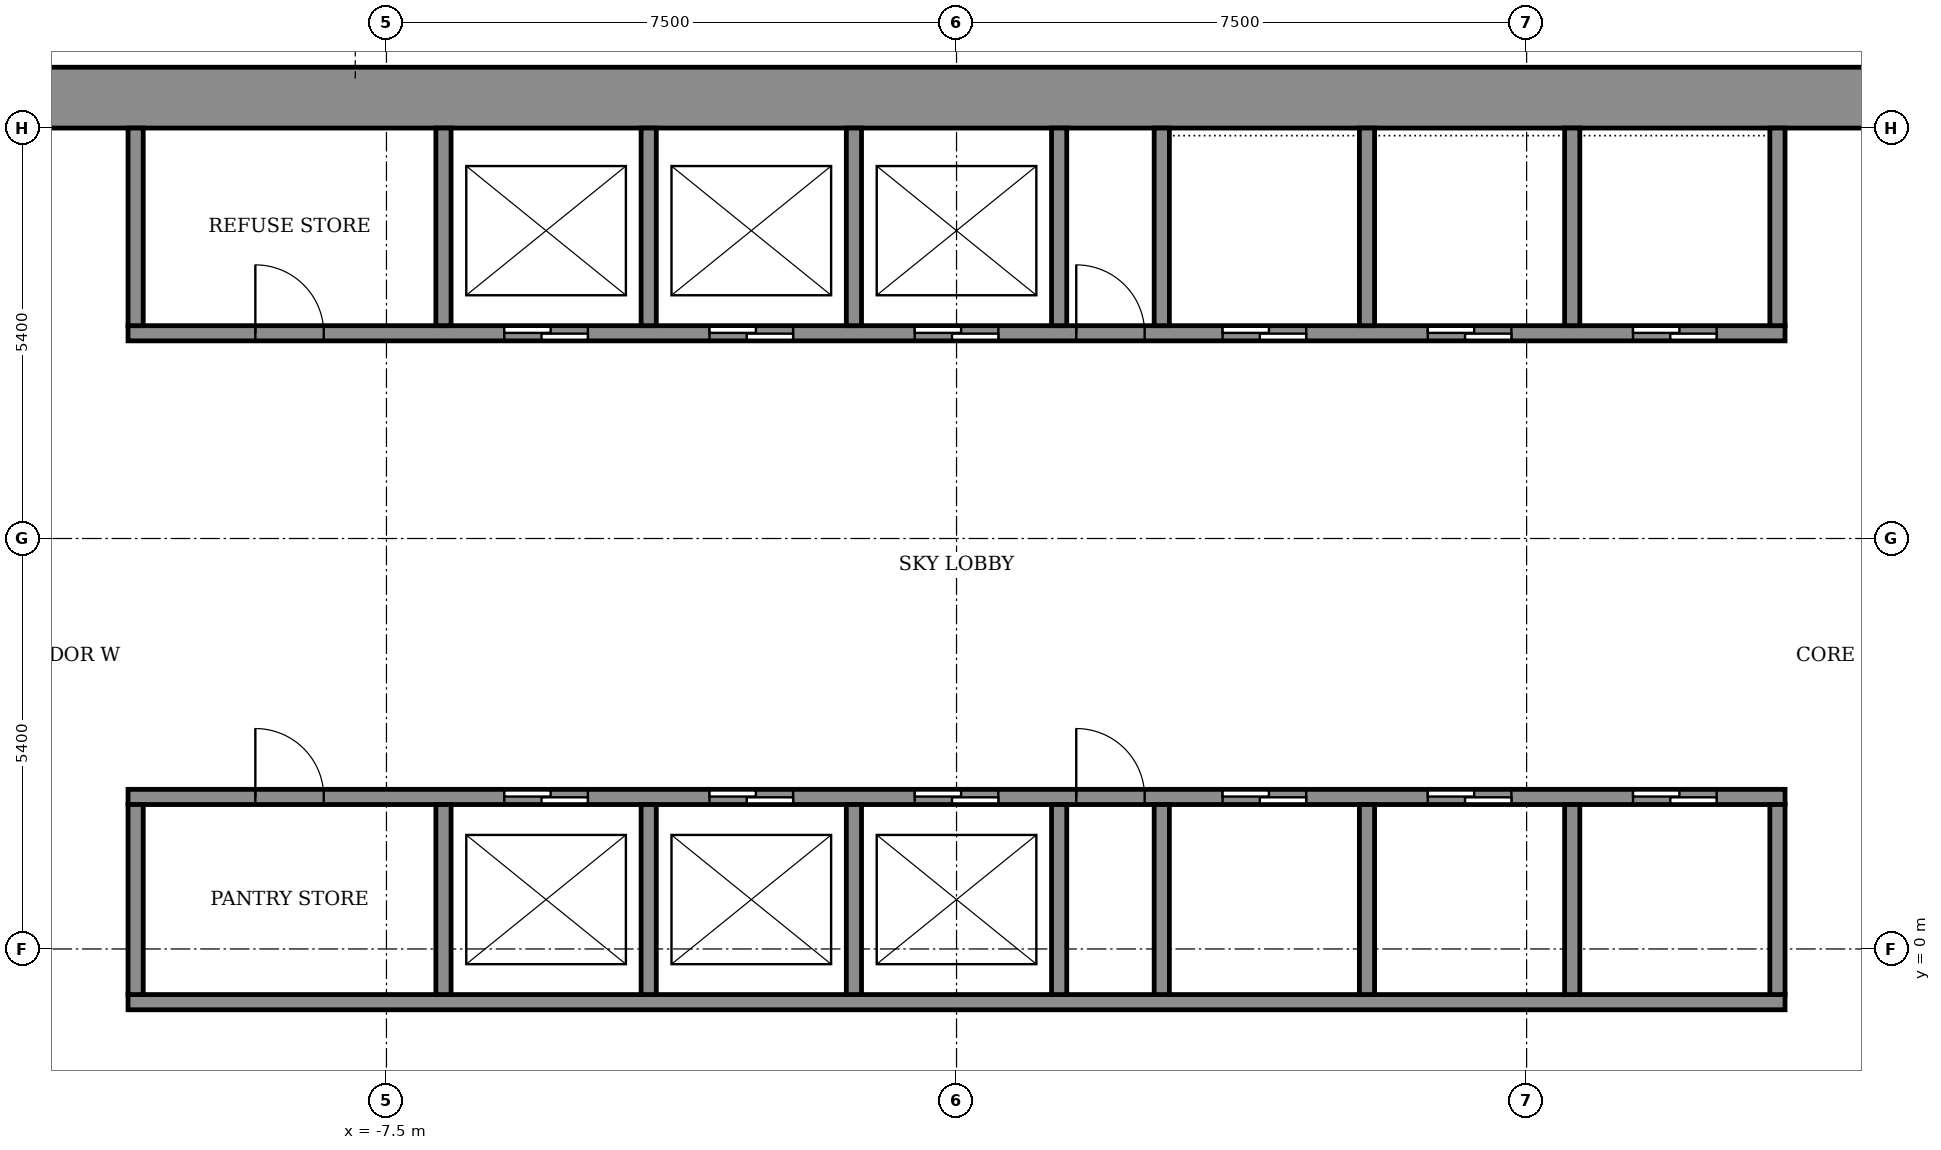
"""IFC4 building model, lengths in metres.
Left out: names, types, materials, properties, quantities, classifications, styles, units other than length and angle.
Written with IfcOpenShell. Run it as: python <this file> out.ifc"""

import sys

from ifc_helpers import new_model, si_unit, direction, frame, frame_2d, origin, place, context, subcontext, project, spatial, rectangle, extrude, element, fill, save


model = new_model("IFC4")
c1 = context("Model", 3, precision=1e-05, world=origin(), true_north=direction((0.0, 1.0)))
c2 = subcontext(c1, "Body", "Model", "MODEL_VIEW")
j1 = project(units=[si_unit("LENGTHUNIT", "METRE"), si_unit("PLANEANGLEUNIT", "RADIAN")], contexts=[c1])
p1 = place(None, origin())
s1 = spatial("IfcSite", under=j1, at=p1, CompositionType="ELEMENT")
p2 = place(p1, origin())
s2 = spatial("IfcBuilding", under=s1, at=p2, CompositionType="ELEMENT")
p3 = place(p2, frame((0.0, 0.0, 219.5)))
s3 = spatial("IfcBuildingStorey", under=s2, at=p3, CompositionType="ELEMENT", Elevation=219.5)
p4 = place(p3, frame((-14.6, 11.2, 0.0), z_axis=(0.0, 0.0, 1.0), x_axis=(1.0, 0.0, 0.0)))
e1 = element("IfcWall", 1, at=p4, inside=s3, PredefinedType="SHEAR", context=c2, shape_type="SweptSolid", body=[
    extrude(rectangle(XDim=29.2, YDim=0.8, at=frame_2d((14.6, 0.0))), origin(), (0.0, 0.0, 1.0), 7.0),
])
p5 = place(p3, frame((-10.9, -0.7, 0.0), z_axis=(0.0, 0.0, 1.0), x_axis=(1.0, 0.0, 0.0)))
e2 = element("IfcWall", 2, at=p5, inside=s3, PredefinedType="SHEAR", context=c2, shape_type="SweptSolid", body=[
    extrude(rectangle(XDim=21.8, YDim=0.2, at=frame_2d((10.9, 0.0))), origin(), (0.0, 0.0, 1.0), 6.45),
])
p6 = place(p3, frame((-10.9, 2.0, 0.0), z_axis=(0.0, 0.0, 1.0), x_axis=(1.0, 0.0, 0.0)))
e3 = element("IfcWall", 3, at=p6, inside=s3, PredefinedType="SHEAR", context=c2, shape_type="SweptSolid", body=[
    extrude(rectangle(XDim=21.8, YDim=0.2, at=frame_2d((10.9, 0.0))), origin(), (0.0, 0.0, 1.0), 6.45),
])
p7 = place(p6, frame((4.95, 0.0, 0.0)))
e4 = element("IfcOpeningElement", 4, at=p7, cuts=e3, PredefinedType="OPENING", context=c2, shape_type="SweptSolid", body=[
    extrude(rectangle(XDim=1.1, YDim=2.1, at=frame_2d((0.55, 1.05))), frame((0.0, 0.11, 0.0), z_axis=(0.0, -1.0, 0.0), x_axis=(1.0, 0.0, 0.0)), (0.0, 0.0, 1.0), 0.22),
])
p8 = place(p6, frame((7.65, 0.0, 0.0)))
e5 = element("IfcOpeningElement", 5, at=p8, cuts=e3, PredefinedType="OPENING", context=c2, shape_type="SweptSolid", body=[
    extrude(rectangle(XDim=1.1, YDim=2.1, at=frame_2d((0.55, 1.05))), frame((0.0, 0.11, 0.0), z_axis=(0.0, -1.0, 0.0), x_axis=(1.0, 0.0, 0.0)), (0.0, 0.0, 1.0), 0.22),
])
p9 = place(p6, frame((10.35, 0.0, 0.0)))
e6 = element("IfcOpeningElement", 6, at=p9, cuts=e3, PredefinedType="OPENING", context=c2, shape_type="SweptSolid", body=[
    extrude(rectangle(XDim=1.1, YDim=2.1, at=frame_2d((0.55, 1.05))), frame((0.0, 0.11, 0.0), z_axis=(0.0, -1.0, 0.0), x_axis=(1.0, 0.0, 0.0)), (0.0, 0.0, 1.0), 0.22),
])
p10 = place(p6, frame((14.4, 0.0, 0.0)))
e7 = element("IfcOpeningElement", 7, at=p10, cuts=e3, PredefinedType="OPENING", context=c2, shape_type="SweptSolid", body=[
    extrude(rectangle(XDim=1.1, YDim=2.1, at=frame_2d((0.55, 1.05))), frame((0.0, 0.11, 0.0), z_axis=(0.0, -1.0, 0.0), x_axis=(1.0, 0.0, 0.0)), (0.0, 0.0, 1.0), 0.22),
])
p11 = place(p6, frame((17.1, 0.0, 0.0)))
e8 = element("IfcOpeningElement", 8, at=p11, cuts=e3, PredefinedType="OPENING", context=c2, shape_type="SweptSolid", body=[
    extrude(rectangle(XDim=1.1, YDim=2.1, at=frame_2d((0.55, 1.05))), frame((0.0, 0.11, 0.0), z_axis=(0.0, -1.0, 0.0), x_axis=(1.0, 0.0, 0.0)), (0.0, 0.0, 1.0), 0.22),
])
p12 = place(p6, frame((19.8, 0.0, 0.0)))
e9 = element("IfcOpeningElement", 9, at=p12, cuts=e3, PredefinedType="OPENING", context=c2, shape_type="SweptSolid", body=[
    extrude(rectangle(XDim=1.1, YDim=2.1, at=frame_2d((0.55, 1.05))), frame((0.0, 0.11, 0.0), z_axis=(0.0, -1.0, 0.0), x_axis=(1.0, 0.0, 0.0)), (0.0, 0.0, 1.0), 0.22),
])
p13 = place(p6, frame((1.675, 0.0, 0.0)))
e10 = element("IfcOpeningElement", 10, at=p13, cuts=e3, PredefinedType="OPENING", context=c2, shape_type="SweptSolid", body=[
    extrude(rectangle(XDim=0.9, YDim=2.1, at=frame_2d((0.45, 1.05))), frame((0.0, 0.11, 0.0), z_axis=(0.0, -1.0, 0.0), x_axis=(1.0, 0.0, 0.0)), (0.0, 0.0, 1.0), 0.22),
])
p14 = place(p6, frame((12.475, 0.0, 0.0)))
e11 = element("IfcOpeningElement", 11, at=p14, cuts=e3, PredefinedType="OPENING", context=c2, shape_type="SweptSolid", body=[
    extrude(rectangle(XDim=0.9, YDim=2.1, at=frame_2d((0.45, 1.05))), frame((0.0, 0.11, 0.0), z_axis=(0.0, -1.0, 0.0), x_axis=(1.0, 0.0, 0.0)), (0.0, 0.0, 1.0), 0.22),
])
p15 = place(p3, frame((-10.9, 8.1, 0.0), z_axis=(0.0, 0.0, 1.0), x_axis=(1.0, 0.0, 0.0)))
e12 = element("IfcWall", 12, at=p15, inside=s3, PredefinedType="SHEAR", context=c2, shape_type="SweptSolid", body=[
    extrude(rectangle(XDim=21.8, YDim=0.2, at=frame_2d((10.9, 0.0))), origin(), (0.0, 0.0, 1.0), 6.45),
])
p16 = place(p15, frame((4.95, 0.0, 0.0)))
e13 = element("IfcOpeningElement", 13, at=p16, cuts=e12, PredefinedType="OPENING", context=c2, shape_type="SweptSolid", body=[
    extrude(rectangle(XDim=1.1, YDim=2.1, at=frame_2d((0.55, 1.05))), frame((0.0, 0.11, 0.0), z_axis=(0.0, -1.0, 0.0), x_axis=(1.0, 0.0, 0.0)), (0.0, 0.0, 1.0), 0.22),
])
p17 = place(p15, frame((7.65, 0.0, 0.0)))
e14 = element("IfcOpeningElement", 14, at=p17, cuts=e12, PredefinedType="OPENING", context=c2, shape_type="SweptSolid", body=[
    extrude(rectangle(XDim=1.1, YDim=2.1, at=frame_2d((0.55, 1.05))), frame((0.0, 0.11, 0.0), z_axis=(0.0, -1.0, 0.0), x_axis=(1.0, 0.0, 0.0)), (0.0, 0.0, 1.0), 0.22),
])
p18 = place(p15, frame((10.35, 0.0, 0.0)))
e15 = element("IfcOpeningElement", 15, at=p18, cuts=e12, PredefinedType="OPENING", context=c2, shape_type="SweptSolid", body=[
    extrude(rectangle(XDim=1.1, YDim=2.1, at=frame_2d((0.55, 1.05))), frame((0.0, 0.11, 0.0), z_axis=(0.0, -1.0, 0.0), x_axis=(1.0, 0.0, 0.0)), (0.0, 0.0, 1.0), 0.22),
])
p19 = place(p15, frame((14.4, 0.0, 0.0)))
e16 = element("IfcOpeningElement", 16, at=p19, cuts=e12, PredefinedType="OPENING", context=c2, shape_type="SweptSolid", body=[
    extrude(rectangle(XDim=1.1, YDim=2.1, at=frame_2d((0.55, 1.05))), frame((0.0, 0.11, 0.0), z_axis=(0.0, -1.0, 0.0), x_axis=(1.0, 0.0, 0.0)), (0.0, 0.0, 1.0), 0.22),
])
p20 = place(p15, frame((17.1, 0.0, 0.0)))
e17 = element("IfcOpeningElement", 17, at=p20, cuts=e12, PredefinedType="OPENING", context=c2, shape_type="SweptSolid", body=[
    extrude(rectangle(XDim=1.1, YDim=2.1, at=frame_2d((0.55, 1.05))), frame((0.0, 0.11, 0.0), z_axis=(0.0, -1.0, 0.0), x_axis=(1.0, 0.0, 0.0)), (0.0, 0.0, 1.0), 0.22),
])
p21 = place(p15, frame((19.8, 0.0, 0.0)))
e18 = element("IfcOpeningElement", 18, at=p21, cuts=e12, PredefinedType="OPENING", context=c2, shape_type="SweptSolid", body=[
    extrude(rectangle(XDim=1.1, YDim=2.1, at=frame_2d((0.55, 1.05))), frame((0.0, 0.11, 0.0), z_axis=(0.0, -1.0, 0.0), x_axis=(1.0, 0.0, 0.0)), (0.0, 0.0, 1.0), 0.22),
])
p22 = place(p15, frame((1.675, 0.0, 0.0)))
e19 = element("IfcOpeningElement", 19, at=p22, cuts=e12, PredefinedType="OPENING", context=c2, shape_type="SweptSolid", body=[
    extrude(rectangle(XDim=0.9, YDim=2.1, at=frame_2d((0.45, 1.05))), frame((0.0, 0.11, 0.0), z_axis=(0.0, -1.0, 0.0), x_axis=(1.0, 0.0, 0.0)), (0.0, 0.0, 1.0), 0.22),
])
p23 = place(p15, frame((12.475, 0.0, 0.0)))
e20 = element("IfcOpeningElement", 20, at=p23, cuts=e12, PredefinedType="OPENING", context=c2, shape_type="SweptSolid", body=[
    extrude(rectangle(XDim=0.9, YDim=2.1, at=frame_2d((0.45, 1.05))), frame((0.0, 0.11, 0.0), z_axis=(0.0, -1.0, 0.0), x_axis=(1.0, 0.0, 0.0)), (0.0, 0.0, 1.0), 0.22),
])
p24 = place(p3, frame((-10.8, -0.6, 0.0), z_axis=(0.0, 0.0, 1.0), x_axis=(0.0, 1.0, 0.0)))
e21 = element("IfcWall", 21, at=p24, inside=s3, PredefinedType="STANDARD", context=c2, shape_type="SweptSolid", body=[
    extrude(rectangle(XDim=2.5, YDim=0.2, at=frame_2d((1.25, 0.0))), origin(), (0.0, 0.0, 1.0), 6.45),
])
for number, where, z_axis, x_axis in (
    (22, (-6.75, -0.6, 0.0), (0.0, 0.0, 1.0), (0.0, 1.0, 0.0)),
    (23, (-4.05, -0.6, 0.0), (0.0, 0.0, 1.0), (0.0, 1.0, 0.0)),
    (24, (-1.35, -0.6, 0.0), (0.0, 0.0, 1.0), (0.0, 1.0, 0.0)),
    (25, (1.35, -0.6, 0.0), (0.0, 0.0, 1.0), (0.0, 1.0, 0.0)),
    (26, (2.7, -0.6, 0.0), (0.0, 0.0, 1.0), (0.0, 1.0, 0.0)),
    (27, (5.4, -0.6, 0.0), (0.0, 0.0, 1.0), (0.0, 1.0, 0.0)),
    (28, (8.1, -0.6, 0.0), (0.0, 0.0, 1.0), (0.0, 1.0, 0.0)),
    (29, (10.8, -0.6, 0.0), (0.0, 0.0, 1.0), (0.0, 1.0, 0.0)),
):
    element("IfcWall", number, at=place(p3, frame(where, z_axis=z_axis, x_axis=x_axis)), inside=s3, PredefinedType="SHEAR", context=c2, shape_type="SweptSolid", body=[
        extrude(rectangle(XDim=2.5, YDim=0.2, at=frame_2d((1.25, 0.0))), origin(), (0.0, 0.0, 1.0), 6.45),
    ])
p25 = place(p3, frame((-10.8, 8.2, 0.0), z_axis=(0.0, 0.0, 1.0), x_axis=(0.0, 1.0, 0.0)))
e30 = element("IfcWall", 30, at=p25, inside=s3, PredefinedType="STANDARD", context=c2, shape_type="SweptSolid", body=[
    extrude(rectangle(XDim=2.6, YDim=0.2, at=frame_2d((1.3, 0.0))), origin(), (0.0, 0.0, 1.0), 6.45),
])
for number, where, z_axis, x_axis in (
    (31, (-6.75, 8.2, 0.0), (0.0, 0.0, 1.0), (0.0, 1.0, 0.0)),
    (32, (-4.05, 8.2, 0.0), (0.0, 0.0, 1.0), (0.0, 1.0, 0.0)),
    (33, (-1.35, 8.2, 0.0), (0.0, 0.0, 1.0), (0.0, 1.0, 0.0)),
    (34, (1.35, 8.2, 0.0), (0.0, 0.0, 1.0), (0.0, 1.0, 0.0)),
    (35, (2.7, 8.2, 0.0), (0.0, 0.0, 1.0), (0.0, 1.0, 0.0)),
    (36, (5.4, 8.2, 0.0), (0.0, 0.0, 1.0), (0.0, 1.0, 0.0)),
    (37, (8.1, 8.2, 0.0), (0.0, 0.0, 1.0), (0.0, 1.0, 0.0)),
    (38, (10.8, 8.2, 0.0), (0.0, 0.0, 1.0), (0.0, 1.0, 0.0)),
):
    element("IfcWall", number, at=place(p3, frame(where, z_axis=z_axis, x_axis=x_axis)), inside=s3, PredefinedType="SHEAR", context=c2, shape_type="SweptSolid", body=[
        extrude(rectangle(XDim=2.6, YDim=0.2, at=frame_2d((1.3, 0.0))), origin(), (0.0, 0.0, 1.0), 6.45),
    ])
p26 = place(p7, origin())
e39 = element("IfcDoor", 39, at=p26, inside=s3, OperationType="SLIDING_TO_LEFT", PredefinedType="DOOR", context=c2, shape_type="SweptSolid", body=[
    extrude(rectangle(XDim=1.1, YDim=2.1, at=frame_2d((0.55, 1.05))), frame((0.0, 0.025, 0.0), z_axis=(0.0, -1.0, 0.0), x_axis=(1.0, 0.0, 0.0)), (0.0, 0.0, 1.0), 0.05),
])
fill(e4, e39)
p27 = place(p8, origin())
e40 = element("IfcDoor", 40, at=p27, inside=s3, OperationType="SLIDING_TO_LEFT", PredefinedType="DOOR", context=c2, shape_type="SweptSolid", body=[
    extrude(rectangle(XDim=1.1, YDim=2.1, at=frame_2d((0.55, 1.05))), frame((0.0, 0.025, 0.0), z_axis=(0.0, -1.0, 0.0), x_axis=(1.0, 0.0, 0.0)), (0.0, 0.0, 1.0), 0.05),
])
fill(e5, e40)
p28 = place(p9, origin())
e41 = element("IfcDoor", 41, at=p28, inside=s3, OperationType="SLIDING_TO_LEFT", PredefinedType="DOOR", context=c2, shape_type="SweptSolid", body=[
    extrude(rectangle(XDim=1.1, YDim=2.1, at=frame_2d((0.55, 1.05))), frame((0.0, 0.025, 0.0), z_axis=(0.0, -1.0, 0.0), x_axis=(1.0, 0.0, 0.0)), (0.0, 0.0, 1.0), 0.05),
])
fill(e6, e41)
p29 = place(p10, origin())
e42 = element("IfcDoor", 42, at=p29, inside=s3, OperationType="SLIDING_TO_LEFT", PredefinedType="DOOR", context=c2, shape_type="SweptSolid", body=[
    extrude(rectangle(XDim=1.1, YDim=2.1, at=frame_2d((0.55, 1.05))), frame((0.0, 0.025, 0.0), z_axis=(0.0, -1.0, 0.0), x_axis=(1.0, 0.0, 0.0)), (0.0, 0.0, 1.0), 0.05),
])
fill(e7, e42)
p30 = place(p11, origin())
e43 = element("IfcDoor", 43, at=p30, inside=s3, OperationType="SLIDING_TO_LEFT", PredefinedType="DOOR", context=c2, shape_type="SweptSolid", body=[
    extrude(rectangle(XDim=1.1, YDim=2.1, at=frame_2d((0.55, 1.05))), frame((0.0, 0.025, 0.0), z_axis=(0.0, -1.0, 0.0), x_axis=(1.0, 0.0, 0.0)), (0.0, 0.0, 1.0), 0.05),
])
fill(e8, e43)
p31 = place(p12, origin())
e44 = element("IfcDoor", 44, at=p31, inside=s3, OperationType="SLIDING_TO_LEFT", PredefinedType="DOOR", context=c2, shape_type="SweptSolid", body=[
    extrude(rectangle(XDim=1.1, YDim=2.1, at=frame_2d((0.55, 1.05))), frame((0.0, 0.025, 0.0), z_axis=(0.0, -1.0, 0.0), x_axis=(1.0, 0.0, 0.0)), (0.0, 0.0, 1.0), 0.05),
])
fill(e9, e44)
p32 = place(p16, origin())
e45 = element("IfcDoor", 45, at=p32, inside=s3, OperationType="SLIDING_TO_LEFT", PredefinedType="DOOR", context=c2, shape_type="SweptSolid", body=[
    extrude(rectangle(XDim=1.1, YDim=2.1, at=frame_2d((0.55, 1.05))), frame((0.0, 0.025, 0.0), z_axis=(0.0, -1.0, 0.0), x_axis=(1.0, 0.0, 0.0)), (0.0, 0.0, 1.0), 0.05),
])
fill(e13, e45)
p33 = place(p17, origin())
e46 = element("IfcDoor", 46, at=p33, inside=s3, OperationType="SLIDING_TO_LEFT", PredefinedType="DOOR", context=c2, shape_type="SweptSolid", body=[
    extrude(rectangle(XDim=1.1, YDim=2.1, at=frame_2d((0.55, 1.05))), frame((0.0, 0.025, 0.0), z_axis=(0.0, -1.0, 0.0), x_axis=(1.0, 0.0, 0.0)), (0.0, 0.0, 1.0), 0.05),
])
fill(e14, e46)
p34 = place(p18, origin())
e47 = element("IfcDoor", 47, at=p34, inside=s3, OperationType="SLIDING_TO_LEFT", PredefinedType="DOOR", context=c2, shape_type="SweptSolid", body=[
    extrude(rectangle(XDim=1.1, YDim=2.1, at=frame_2d((0.55, 1.05))), frame((0.0, 0.025, 0.0), z_axis=(0.0, -1.0, 0.0), x_axis=(1.0, 0.0, 0.0)), (0.0, 0.0, 1.0), 0.05),
])
fill(e15, e47)
p35 = place(p19, origin())
e48 = element("IfcDoor", 48, at=p35, inside=s3, OperationType="SLIDING_TO_LEFT", PredefinedType="DOOR", context=c2, shape_type="SweptSolid", body=[
    extrude(rectangle(XDim=1.1, YDim=2.1, at=frame_2d((0.55, 1.05))), frame((0.0, 0.025, 0.0), z_axis=(0.0, -1.0, 0.0), x_axis=(1.0, 0.0, 0.0)), (0.0, 0.0, 1.0), 0.05),
])
fill(e16, e48)
p36 = place(p20, origin())
e49 = element("IfcDoor", 49, at=p36, inside=s3, OperationType="SLIDING_TO_LEFT", PredefinedType="DOOR", context=c2, shape_type="SweptSolid", body=[
    extrude(rectangle(XDim=1.1, YDim=2.1, at=frame_2d((0.55, 1.05))), frame((0.0, 0.025, 0.0), z_axis=(0.0, -1.0, 0.0), x_axis=(1.0, 0.0, 0.0)), (0.0, 0.0, 1.0), 0.05),
])
fill(e17, e49)
p37 = place(p21, origin())
e50 = element("IfcDoor", 50, at=p37, inside=s3, OperationType="SLIDING_TO_LEFT", PredefinedType="DOOR", context=c2, shape_type="SweptSolid", body=[
    extrude(rectangle(XDim=1.1, YDim=2.1, at=frame_2d((0.55, 1.05))), frame((0.0, 0.025, 0.0), z_axis=(0.0, -1.0, 0.0), x_axis=(1.0, 0.0, 0.0)), (0.0, 0.0, 1.0), 0.05),
])
fill(e18, e50)
p38 = place(p13, origin())
e51 = element("IfcDoor", 51, at=p38, inside=s3, OperationType="SINGLE_SWING_RIGHT", PredefinedType="DOOR", context=c2, shape_type="SweptSolid", body=[
    extrude(rectangle(XDim=0.9, YDim=2.1, at=frame_2d((0.45, 1.05))), frame((0.0, 0.025, 0.0), z_axis=(0.0, -1.0, 0.0), x_axis=(1.0, 0.0, 0.0)), (0.0, 0.0, 1.0), 0.05),
])
fill(e10, e51)
p39 = place(p14, origin())
e52 = element("IfcDoor", 52, at=p39, inside=s3, OperationType="SINGLE_SWING_RIGHT", PredefinedType="DOOR", context=c2, shape_type="SweptSolid", body=[
    extrude(rectangle(XDim=0.9, YDim=2.1, at=frame_2d((0.45, 1.05))), frame((0.0, 0.025, 0.0), z_axis=(0.0, -1.0, 0.0), x_axis=(1.0, 0.0, 0.0)), (0.0, 0.0, 1.0), 0.05),
])
fill(e11, e52)
p40 = place(p22, origin())
e53 = element("IfcDoor", 53, at=p40, inside=s3, OperationType="SINGLE_SWING_RIGHT", PredefinedType="DOOR", context=c2, shape_type="SweptSolid", body=[
    extrude(rectangle(XDim=0.9, YDim=2.1, at=frame_2d((0.45, 1.05))), frame((0.0, 0.025, 0.0), z_axis=(0.0, -1.0, 0.0), x_axis=(1.0, 0.0, 0.0)), (0.0, 0.0, 1.0), 0.05),
])
fill(e19, e53)
p41 = place(p23, origin())
e54 = element("IfcDoor", 54, at=p41, inside=s3, OperationType="SINGLE_SWING_LEFT", PredefinedType="DOOR", context=c2, shape_type="SweptSolid", body=[
    extrude(rectangle(XDim=0.9, YDim=2.1, at=frame_2d((0.45, 1.05))), frame((0.0, 0.025, 0.0), z_axis=(0.0, -1.0, 0.0), x_axis=(1.0, 0.0, 0.0)), (0.0, 0.0, 1.0), 0.05),
])
fill(e20, e54)
save(model, sys.argv[1])
